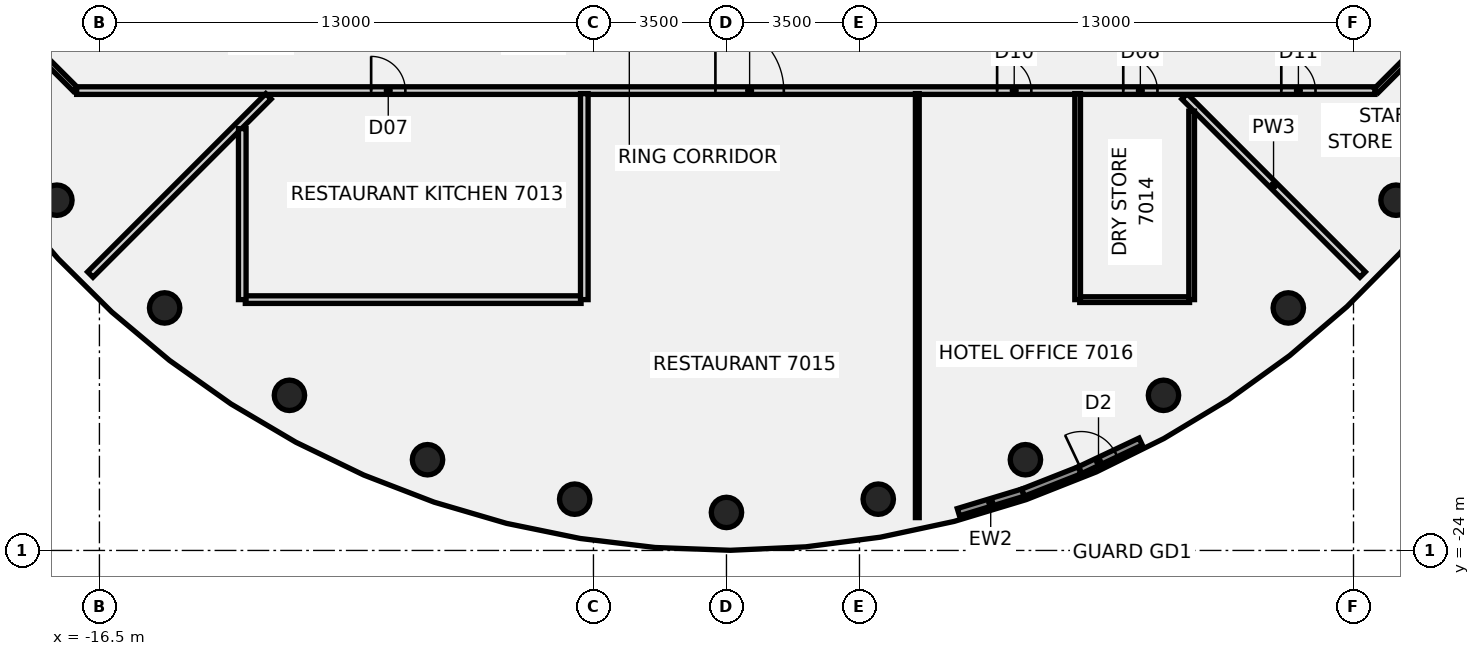
"""IFC4 building model, lengths in metres.
Left out: names, types, materials, properties, quantities, classifications, styles, units other than length and angle.
Written with IfcOpenShell. Run it as: python <this file> out.ifc"""

import sys

from ifc_helpers import new_model, si_unit, direction, frame, frame_2d, origin, origin_2d, place, context, subcontext, project, spatial, rectangle, circle, extrude, element, fill, save


model = new_model("IFC4")
c1 = context("Model", 3, precision=1e-05, world=origin(), true_north=direction((0.0, 1.0)))
c2 = subcontext(c1, "Body", "Model", "MODEL_VIEW")
j1 = project(units=[si_unit("LENGTHUNIT", "METRE"), si_unit("PLANEANGLEUNIT", "RADIAN")], contexts=[c1])
p1 = place(None, origin())
s1 = spatial("IfcSite", under=j1, at=p1, CompositionType="ELEMENT")
p2 = place(p1, origin())
s2 = spatial("IfcBuilding", under=s1, at=p2, CompositionType="ELEMENT")
p3 = place(p2, frame((0.0, 0.0, 274.8)))
s3 = spatial("IfcBuildingStorey", under=s2, at=p3, CompositionType="ELEMENT", Elevation=274.8)
for number, where, z_axis, x_axis in (
    (1, (-17.619, -14.784, -0.14), (0.0, 0.0, 1.0), (1.0, 0.0, 0.0)),
    (2, (-14.784, -17.619, -0.14), (0.0, 0.0, 1.0), (1.0, 0.0, 0.0)),
    (3, (-11.5, -19.919, -0.14), (0.0, 0.0, 1.0), (1.0, 0.0, 0.0)),
    (4, (-7.866, -21.613, -0.14), (0.0, 0.0, 1.0), (1.0, 0.0, 0.0)),
    (5, (-3.994, -22.651, -0.14), (0.0, 0.0, 1.0), (1.0, 0.0, 0.0)),
    (6, (0.0, -23.0, -0.14), (0.0, 0.0, 1.0), (1.0, 0.0, 0.0)),
    (7, (3.994, -22.651, -0.14), (0.0, 0.0, 1.0), (1.0, 0.0, 0.0)),
    (8, (7.866, -21.613, -0.14), (0.0, 0.0, 1.0), (1.0, 0.0, 0.0)),
    (9, (11.5, -19.919, -0.14), (0.0, 0.0, 1.0), (1.0, 0.0, 0.0)),
    (10, (14.784, -17.619, -0.14), (0.0, 0.0, 1.0), (1.0, 0.0, 0.0)),
    (11, (17.619, -14.784, -0.14), (0.0, 0.0, 1.0), (1.0, 0.0, 0.0)),
):
    element("IfcColumn", number, at=place(p3, frame(where, z_axis=z_axis, x_axis=x_axis)), inside=s3, PredefinedType="COLUMN", context=c2, shape_type="SweptSolid", body=[
        extrude(circle(Radius=0.4, at=origin_2d()), origin(), (0.0, 0.0, 1.0), 3.56),
    ])
p4 = place(p3, frame((-18.872, -10.128, 0.0), z_axis=(0.0, 0.0, 1.0), x_axis=(0.707106781187, -0.707106781187, 0.0)))
e12 = element("IfcWall", 12, at=p4, inside=s3, PredefinedType="PARTITIONING", context=c2, shape_type="SweptSolid", body=[
    extrude(rectangle(XDim=2.455, YDim=0.15, at=frame_2d((1.228, 0.0))), origin(), (0.0, 0.0, 1.0), 2.824),
])
p5 = place(p3, frame((12.052, -12.052, 0.0), z_axis=(0.0, 0.0, 1.0), x_axis=(0.707106781187, -0.707106781187, 0.0)))
e13 = element("IfcWall", 13, at=p5, inside=s3, PredefinedType="PARTITIONING", context=c2, shape_type="SweptSolid", body=[
    extrude(rectangle(XDim=6.631, YDim=0.2, at=frame_2d((3.315, 0.0))), origin(), (0.0, 0.0, 1.0), 2.824),
])
p6 = place(p3, frame((-17.1, -11.9, 0.0), z_axis=(0.0, 0.0, 1.0), x_axis=(1.0, 0.0, 0.0)))
e14 = element("IfcWall", 14, at=p6, inside=s3, PredefinedType="PARTITIONING", context=c2, shape_type="SweptSolid", body=[
    extrude(rectangle(XDim=34.165, YDim=0.2, at=frame_2d((17.083, 0.0))), origin(), (0.0, 0.0, 1.0), 2.824),
])
p7 = place(p6, frame((7.75, 0.0, 0.0)))
e15 = element("IfcOpeningElement", 15, at=p7, cuts=e14, PredefinedType="OPENING", context=c2, shape_type="SweptSolid", body=[
    extrude(rectangle(XDim=0.9, YDim=2.1, at=frame_2d((0.45, 1.05))), frame((0.0, 0.11, 0.0), z_axis=(0.0, -1.0, 0.0), x_axis=(1.0, 0.0, 0.0)), (0.0, 0.0, 1.0), 0.22),
])
p8 = place(p6, frame((27.541, 0.0, 0.0)))
e16 = element("IfcOpeningElement", 16, at=p8, cuts=e14, PredefinedType="OPENING", context=c2, shape_type="SweptSolid", body=[
    extrude(rectangle(XDim=0.9, YDim=2.1, at=frame_2d((0.45, 1.05))), frame((0.0, 0.11, 0.0), z_axis=(0.0, -1.0, 0.0), x_axis=(1.0, 0.0, 0.0)), (0.0, 0.0, 1.0), 0.22),
])
p9 = place(p6, frame((16.809, 0.0, 0.0)))
e17 = element("IfcOpeningElement", 17, at=p9, cuts=e14, PredefinedType="OPENING", context=c2, shape_type="SweptSolid", body=[
    extrude(rectangle(XDim=1.8, YDim=2.1, at=frame_2d((0.9, 1.05))), frame((0.0, 0.11, 0.0), z_axis=(0.0, -1.0, 0.0), x_axis=(1.0, 0.0, 0.0)), (0.0, 0.0, 1.0), 0.22),
])
p10 = place(p6, frame((24.222, 0.0, 0.0)))
e18 = element("IfcOpeningElement", 18, at=p10, cuts=e14, PredefinedType="OPENING", context=c2, shape_type="SweptSolid", body=[
    extrude(rectangle(XDim=0.9, YDim=2.1, at=frame_2d((0.45, 1.05))), frame((0.0, 0.11, 0.0), z_axis=(0.0, -1.0, 0.0), x_axis=(1.0, 0.0, 0.0)), (0.0, 0.0, 1.0), 0.22),
])
p11 = place(p6, frame((31.7, 0.0, 0.0)))
e19 = element("IfcOpeningElement", 19, at=p11, cuts=e14, PredefinedType="OPENING", context=c2, shape_type="SweptSolid", body=[
    extrude(rectangle(XDim=0.9, YDim=2.1, at=frame_2d((0.45, 1.05))), frame((0.0, 0.11, 0.0), z_axis=(0.0, -1.0, 0.0), x_axis=(1.0, 0.0, 0.0)), (0.0, 0.0, 1.0), 0.22),
])
p12 = place(p3, frame((-12.661, -17.4, 0.0), z_axis=(0.0, 0.0, 1.0), x_axis=(1.0, 0.0, 0.0)))
e20 = element("IfcWall", 20, at=p12, inside=s3, PredefinedType="PARTITIONING", context=c2, shape_type="SweptSolid", body=[
    extrude(rectangle(XDim=8.835, YDim=0.2, at=frame_2d((4.417, 0.0))), origin(), (0.0, 0.0, 1.0), 2.824),
])
p13 = place(p3, frame((9.296, -17.4, 0.0), z_axis=(0.0, 0.0, 1.0), x_axis=(1.0, 0.0, 0.0)))
e21 = element("IfcWall", 21, at=p13, inside=s3, PredefinedType="PARTITIONING", context=c2, shape_type="SweptSolid", body=[
    extrude(rectangle(XDim=2.89, YDim=0.15, at=frame_2d((1.445, 0.0))), origin(), (0.0, 0.0, 1.0), 2.824),
])
p14 = place(p3, frame((-16.74, -16.74, 0.0), z_axis=(0.0, 0.0, 1.0), x_axis=(0.707106781187, 0.707106781187, 0.0)))
e22 = element("IfcWall", 22, at=p14, inside=s3, PredefinedType="PARTITIONING", context=c2, shape_type="SweptSolid", body=[
    extrude(rectangle(XDim=6.631, YDim=0.2, at=frame_2d((3.315, 0.0))), origin(), (0.0, 0.0, 1.0), 2.824),
])
p15 = place(p3, frame((17.1, -11.9, 0.0), z_axis=(0.0, 0.0, 1.0), x_axis=(0.707106781187, 0.707106781187, 0.0)))
e23 = element("IfcWall", 23, at=p15, inside=s3, PredefinedType="PARTITIONING", context=c2, shape_type="SweptSolid", body=[
    extrude(rectangle(XDim=2.505, YDim=0.15, at=frame_2d((1.253, 0.0))), origin(), (0.0, 0.0, 1.0), 2.824),
])
p16 = place(p3, frame((-12.741, -17.4, 0.0), z_axis=(0.0, 0.0, 1.0), x_axis=(0.0, 1.0, 0.0)))
e24 = element("IfcWall", 24, at=p16, inside=s3, PredefinedType="PARTITIONING", context=c2, shape_type="SweptSolid", body=[
    extrude(rectangle(XDim=4.499, YDim=0.2, at=frame_2d((2.25, 0.0))), origin(), (0.0, 0.0, 1.0), 2.824),
])
p17 = place(p3, frame((-3.741, -17.4, 0.0), z_axis=(0.0, 0.0, 1.0), x_axis=(0.0, 1.0, 0.0)))
e25 = element("IfcWall", 25, at=p17, inside=s3, PredefinedType="PARTITIONING", context=c2, shape_type="SweptSolid", body=[
    extrude(rectangle(XDim=5.42, YDim=0.2, at=frame_2d((2.71, 0.0))), origin(), (0.0, 0.0, 1.0), 2.824),
])
p18 = place(p3, frame((5.022, -23.136, 0.0), z_axis=(0.0, 0.0, 1.0), x_axis=(0.0, 1.0, 0.0)))
e26 = element("IfcWall", 26, at=p18, inside=s3, PredefinedType="PARTITIONING", context=c2, shape_type="SweptSolid", body=[
    extrude(rectangle(XDim=11.156, YDim=0.1, at=frame_2d((5.578, 0.0))), origin(), (0.0, 0.0, 1.0), 2.824),
])
p19 = place(p3, frame((9.241, -17.4, 0.0), z_axis=(0.0, 0.0, 1.0), x_axis=(0.0, 1.0, 0.0)))
e27 = element("IfcWall", 27, at=p19, inside=s3, PredefinedType="PARTITIONING", context=c2, shape_type="SweptSolid", body=[
    extrude(rectangle(XDim=5.42, YDim=0.15, at=frame_2d((2.71, 0.0))), origin(), (0.0, 0.0, 1.0), 2.824),
])
p20 = place(p3, frame((12.241, -17.4, 0.0), z_axis=(0.0, 0.0, 1.0), x_axis=(0.0, 1.0, 0.0)))
e28 = element("IfcWall", 28, at=p20, inside=s3, PredefinedType="PARTITIONING", context=c2, shape_type="SweptSolid", body=[
    extrude(rectangle(XDim=4.959, YDim=0.15, at=frame_2d((2.479, 0.0))), origin(), (0.0, 0.0, 1.0), 2.824),
])
p21 = place(p3, frame((6.103, -22.993, 0.0), z_axis=(0.0, 0.0, 1.0), x_axis=(0.957181343186, 0.289488991598, 0.0)))
e29 = element("IfcWall", 29, at=p21, inside=s3, PredefinedType="SOLIDWALL", context=c2, shape_type="SweptSolid", body=[
    extrude(rectangle(XDim=1.778, YDim=0.2, at=frame_2d((0.889, 0.0))), origin(), (0.0, 0.0, 1.0), 3.42),
])
p22 = place(p3, frame((9.293, -21.892, 0.0), z_axis=(0.0, 0.0, 1.0), x_axis=(0.904313494598, 0.426868953529, 0.0)))
e30 = element("IfcWall", 30, at=p22, inside=s3, PredefinedType="SOLIDWALL", context=c2, shape_type="SweptSolid", body=[
    extrude(rectangle(XDim=1.776, YDim=0.2, at=frame_2d((0.888, 0.0))), origin(), (0.0, 0.0, 1.0), 3.42),
])
p23 = place(p22, frame((0.05, 0.0, 0.0)))
e31 = element("IfcOpeningElement", 31, at=p23, cuts=e30, PredefinedType="OPENING", context=c2, shape_type="SweptSolid", body=[
    extrude(rectangle(XDim=1.0, YDim=2.4, at=frame_2d((0.5, 1.2))), frame((0.0, 0.11, 0.0), z_axis=(0.0, -1.0, 0.0), x_axis=(1.0, 0.0, 0.0)), (0.0, 0.0, 1.0), 0.22),
])
p24 = place(p3, frame((7.804, -22.479, 0.0), z_axis=(0.0, 0.0, 1.0), x_axis=(0.930400507878, 0.366544533365, 0.0)))
e32 = element("IfcWall", 32, at=p24, inside=s3, PredefinedType="SOLIDWALL", context=c2, shape_type="SweptSolid", body=[
    extrude(rectangle(XDim=1.6, YDim=0.2, at=frame_2d((0.8, 0.0))), origin(), (0.0, 0.0, 1.0), 3.42),
])
p25 = place(p7, frame((0.9, 0.0, 0.0), z_axis=(0.0, 0.0, 1.0), x_axis=(-1.0, 0.0, 0.0)))
e33 = element("IfcDoor", 33, at=p25, inside=s3, OperationType="SINGLE_SWING_LEFT", PredefinedType="DOOR", context=c2, shape_type="SweptSolid", body=[
    extrude(rectangle(XDim=0.9, YDim=2.1, at=frame_2d((0.45, 1.05))), frame((0.0, 0.025, 0.0), z_axis=(0.0, -1.0, 0.0), x_axis=(1.0, 0.0, 0.0)), (0.0, 0.0, 1.0), 0.05),
])
fill(e15, e33)
p26 = place(p8, frame((0.9, 0.0, 0.0), z_axis=(0.0, 0.0, 1.0), x_axis=(-1.0, 0.0, 0.0)))
e34 = element("IfcDoor", 34, at=p26, inside=s3, OperationType="SINGLE_SWING_RIGHT", PredefinedType="DOOR", context=c2, shape_type="SweptSolid", body=[
    extrude(rectangle(XDim=0.9, YDim=2.1, at=frame_2d((0.45, 1.05))), frame((0.0, 0.025, 0.0), z_axis=(0.0, -1.0, 0.0), x_axis=(1.0, 0.0, 0.0)), (0.0, 0.0, 1.0), 0.05),
])
fill(e16, e34)
p27 = place(p9, origin())
e35 = element("IfcDoor", 35, at=p27, inside=s3, OperationType="DOUBLE_DOOR_SINGLE_SWING", PredefinedType="DOOR", context=c2, shape_type="SweptSolid", body=[
    extrude(rectangle(XDim=1.8, YDim=2.1, at=frame_2d((0.9, 1.05))), frame((0.0, 0.025, 0.0), z_axis=(0.0, -1.0, 0.0), x_axis=(1.0, 0.0, 0.0)), (0.0, 0.0, 1.0), 0.05),
])
fill(e17, e35)
p28 = place(p10, frame((0.9, 0.0, 0.0), z_axis=(0.0, 0.0, 1.0), x_axis=(-1.0, 0.0, 0.0)))
e36 = element("IfcDoor", 36, at=p28, inside=s3, OperationType="SINGLE_SWING_RIGHT", PredefinedType="DOOR", context=c2, shape_type="SweptSolid", body=[
    extrude(rectangle(XDim=0.9, YDim=2.1, at=frame_2d((0.45, 1.05))), frame((0.0, 0.025, 0.0), z_axis=(0.0, -1.0, 0.0), x_axis=(1.0, 0.0, 0.0)), (0.0, 0.0, 1.0), 0.05),
])
fill(e18, e36)
p29 = place(p11, frame((0.9, 0.0, 0.0), z_axis=(0.0, 0.0, 1.0), x_axis=(-1.0, 0.0, 0.0)))
e37 = element("IfcDoor", 37, at=p29, inside=s3, OperationType="SINGLE_SWING_RIGHT", PredefinedType="DOOR", context=c2, shape_type="SweptSolid", body=[
    extrude(rectangle(XDim=0.9, YDim=2.1, at=frame_2d((0.45, 1.05))), frame((0.0, 0.025, 0.0), z_axis=(0.0, -1.0, 0.0), x_axis=(1.0, 0.0, 0.0)), (0.0, 0.0, 1.0), 0.05),
])
fill(e19, e37)
p30 = place(p23, origin())
e38 = element("IfcDoor", 38, at=p30, inside=s3, OperationType="SINGLE_SWING_LEFT", PredefinedType="DOOR", context=c2, shape_type="SweptSolid", body=[
    extrude(rectangle(XDim=1.0, YDim=2.4, at=frame_2d((0.5, 1.2))), frame((0.0, 0.025, 0.0), z_axis=(0.0, -1.0, 0.0), x_axis=(1.0, 0.0, 0.0)), (0.0, 0.0, 1.0), 0.05),
])
fill(e31, e38)
save(model, sys.argv[1])
